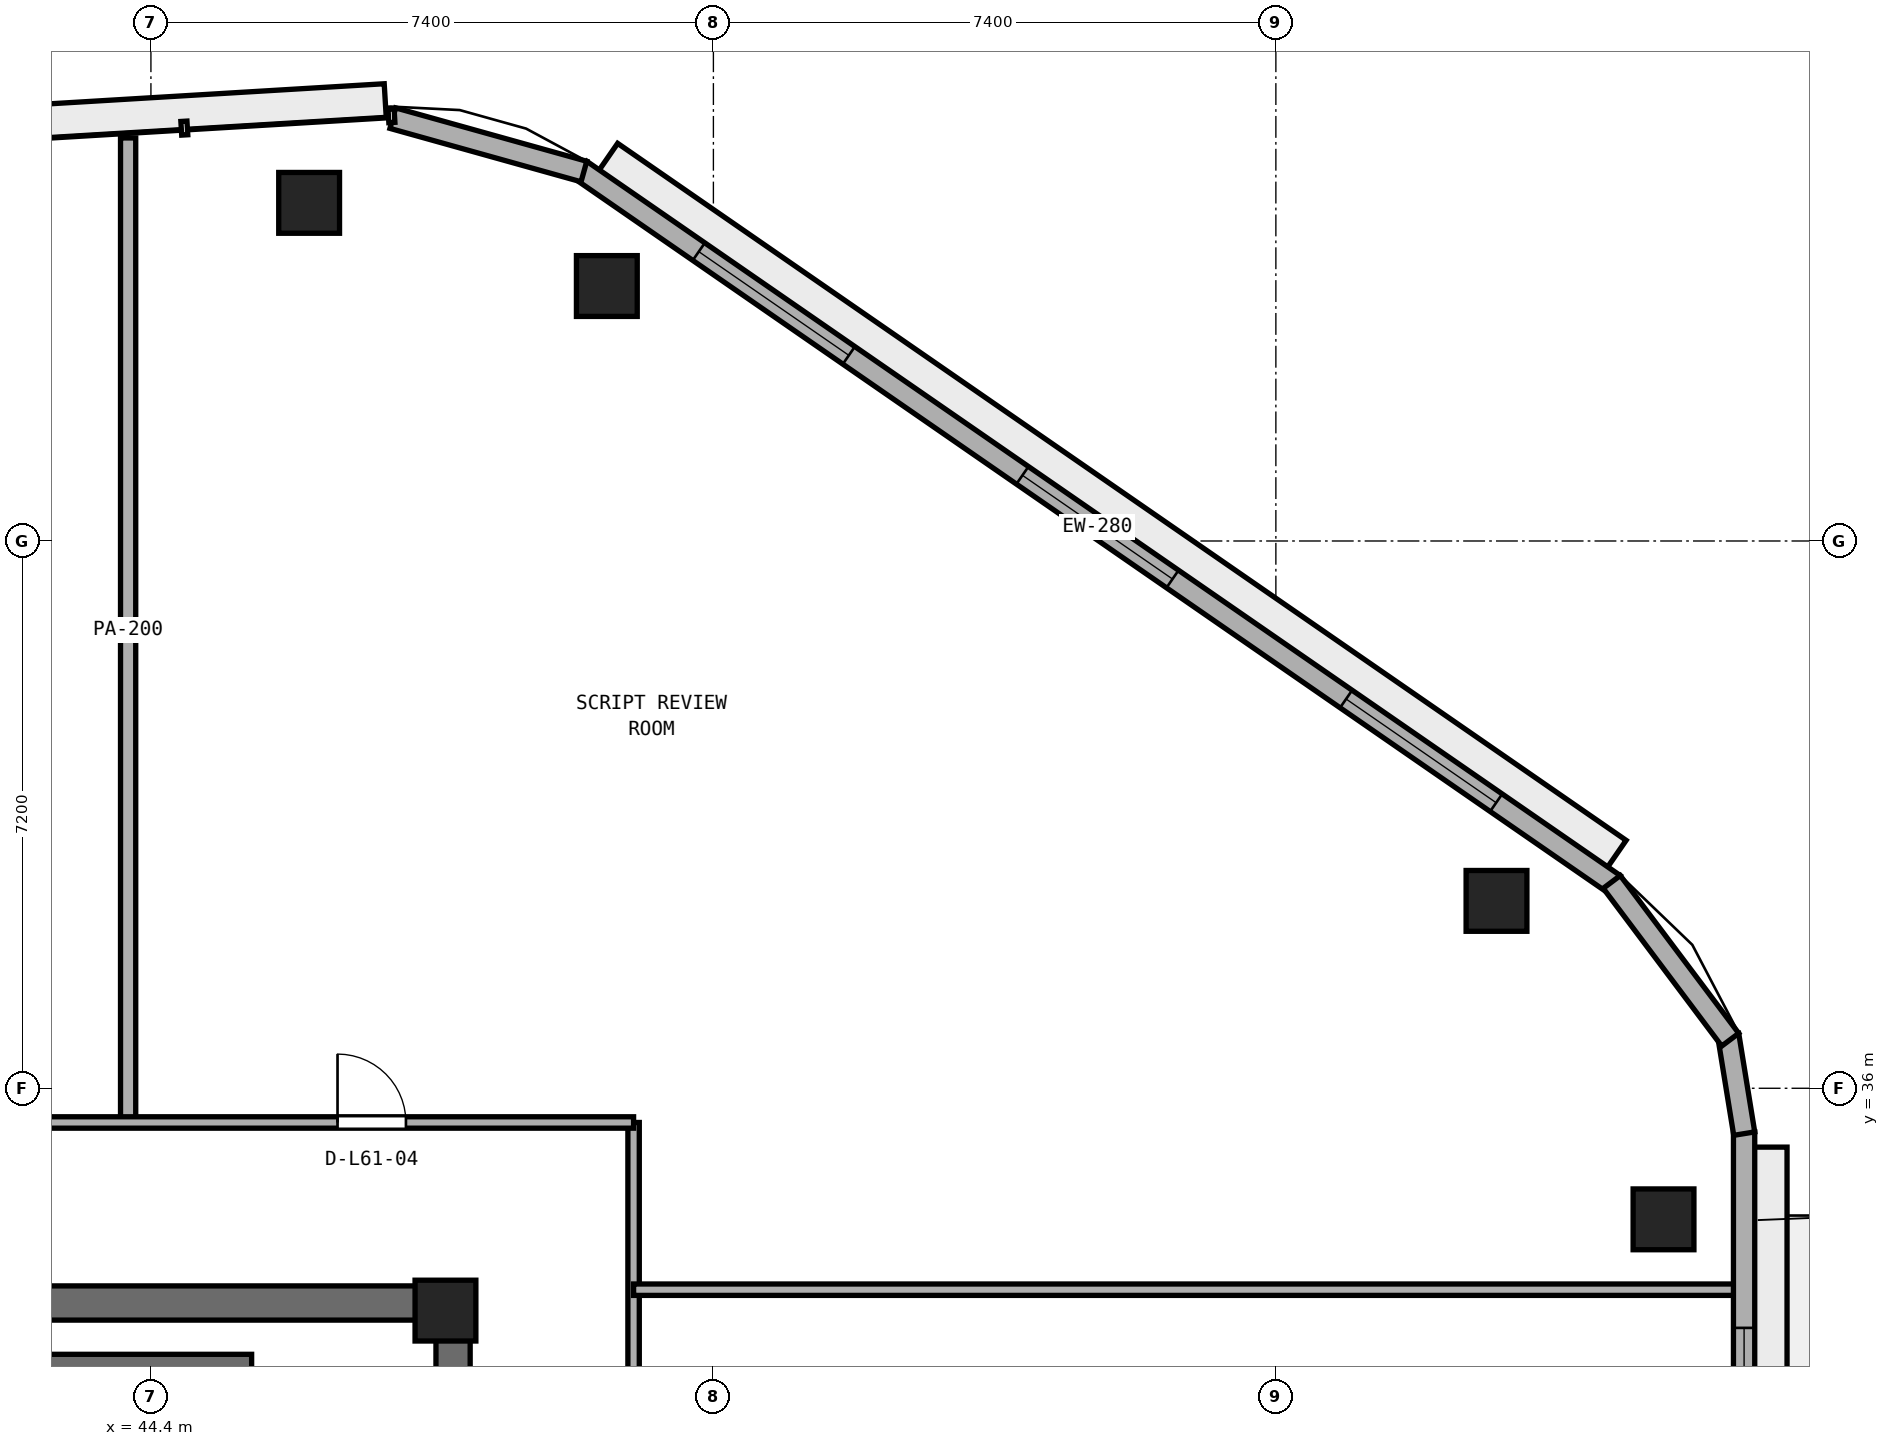
"""IFC4 building model, lengths in metres.
Left out: names, types, materials, properties, quantities, classifications, styles, units other than length and angle.
Written with IfcOpenShell. Run it as: python <this file> out.ifc"""

import sys

from ifc_helpers import new_model, si_unit, direction, frame, frame_2d, origin, origin_2d, place, context, subcontext, project, spatial, rectangle, extrude, element, fill, save


model = new_model("IFC4")
c1 = context("Model", 3, precision=1e-05, world=origin(), true_north=direction((0.0, 1.0)))
c2 = subcontext(c1, "Body", "Model", "MODEL_VIEW")
j1 = project(units=[si_unit("LENGTHUNIT", "METRE"), si_unit("PLANEANGLEUNIT", "RADIAN")], contexts=[c1])
p1 = place(None, origin())
s1 = spatial("IfcSite", under=j1, at=p1, CompositionType="ELEMENT")
p2 = place(p1, origin())
s2 = spatial("IfcBuilding", under=s1, at=p2, CompositionType="ELEMENT")
p3 = place(p2, frame((0.0, 0.0, 240.2)))
s3 = spatial("IfcBuildingStorey", under=s2, at=p3, CompositionType="ELEMENT", Elevation=240.2)
p4 = place(p3, frame((25.4, 33.175, 0.0), z_axis=(0.0, 0.0, 1.0), x_axis=(1.0, 0.0, 0.0)))
e1 = element("IfcWall", 1, at=p4, inside=s3, PredefinedType="SHEAR", context=c2, shape_type="SweptSolid", body=[
    extrude(rectangle(XDim=23.2, YDim=0.45, at=frame_2d((11.6, 0.0))), origin(), (0.0, 0.0, 1.0), 3.51),
])
p5 = place(p3, frame((48.375, 17.45, 0.0), z_axis=(0.0, 0.0, 1.0), x_axis=(0.0, 1.0, 0.0)))
e2 = element("IfcWall", 2, at=p5, inside=s3, PredefinedType="SHEAR", context=c2, shape_type="SweptSolid", body=[
    extrude(rectangle(XDim=15.5, YDim=0.45, at=frame_2d((7.75, 0.0))), origin(), (0.0, 0.0, 1.0), 3.51),
])
p6 = place(p5, frame((5.85, 0.0, 0.0)))
e3 = element("IfcOpeningElement", 3, at=p6, cuts=e2, PredefinedType="OPENING", context=c2, shape_type="SweptSolid", body=[
    extrude(rectangle(XDim=1.5, YDim=2.15, at=frame_2d((0.75, 1.075))), frame((0.0, 0.235, 0.0), z_axis=(0.0, -1.0, 0.0), x_axis=(1.0, 0.0, 0.0)), (0.0, 0.0, 1.0), 0.47),
])
p7 = place(p3, frame((48.275, 33.075, 0.0), z_axis=(0.0, 0.0, 1.0), x_axis=(1.0, 0.0, 0.0)))
e4 = element("IfcColumn", 4, at=p7, inside=s3, PredefinedType="PILASTER", context=c2, shape_type="SweptSolid", body=[
    extrude(rectangle(XDim=0.8, YDim=0.8, at=origin_2d()), origin(), (0.0, 0.0, 1.0), 3.8),
])
for number, where, z_axis, x_axis in (
    (5, (64.3, 34.276, 0.0), (0.0, 0.0, 1.0), (1.0, 0.0, 0.0)),
    (6, (62.103, 38.465, 0.0), (0.0, 0.0, 1.0), (1.0, 0.0, 0.0)),
    (7, (50.398, 46.554, 0.0), (0.0, 0.0, 1.0), (1.0, 0.0, 0.0)),
    (8, (46.481, 47.648, 0.0), (0.0, 0.0, 1.0), (1.0, 0.0, 0.0)),
):
    element("IfcColumn", number, at=place(p3, frame(where, z_axis=z_axis, x_axis=x_axis)), inside=s3, PredefinedType="COLUMN", context=c2, shape_type="SweptSolid", body=[
        extrude(rectangle(XDim=0.8, YDim=0.8, at=origin_2d()), origin(), (0.0, 0.0, 1.0), 3.8),
    ])
p8 = place(p3, frame((38.425, 32.375, 0.0), z_axis=(0.0, 0.0, 1.0), x_axis=(1.0, 0.0, 0.0)))
e9 = element("IfcWall", 9, at=p8, inside=s3, PredefinedType="SHEAR", context=c2, shape_type="SweptSolid", body=[
    extrude(rectangle(XDim=7.3, YDim=0.25, at=frame_2d((3.65, 0.0))), origin(), (0.0, 0.0, 1.0), 3.51),
])
p9 = place(p3, frame((50.75, 22.6, 0.0), z_axis=(0.0, 0.0, 1.0), x_axis=(0.0, 1.0, 0.0)))
e10 = element("IfcWall", 10, at=p9, inside=s3, PredefinedType="PARTITIONING", context=c2, shape_type="SweptSolid", body=[
    extrude(rectangle(XDim=12.95, YDim=0.15, at=frame_2d((6.475, 0.0))), origin(), (0.0, 0.0, 1.0), 3.51),
])
p10 = place(p9, frame((2.17, 0.0, 0.0)))
e11 = element("IfcOpeningElement", 11, at=p10, cuts=e10, PredefinedType="OPENING", context=c2, shape_type="SweptSolid", body=[
    extrude(rectangle(XDim=0.9, YDim=2.1, at=frame_2d((0.45, 1.05))), frame((0.0, 0.085, 0.0), z_axis=(0.0, -1.0, 0.0), x_axis=(1.0, 0.0, 0.0)), (0.0, 0.0, 1.0), 0.17),
])
p11 = place(p9, frame((7.375, 0.0, 0.0)))
e12 = element("IfcOpeningElement", 12, at=p11, cuts=e10, PredefinedType="OPENING", context=c2, shape_type="SweptSolid", body=[
    extrude(rectangle(XDim=1.0, YDim=2.12, at=frame_2d((0.5, 1.06))), frame((0.0, 0.085, 0.0), z_axis=(0.0, -1.0, 0.0), x_axis=(1.0, 0.0, 0.0)), (0.0, 0.0, 1.0), 0.17),
])
p12 = place(p3, frame((44.1, 35.55, 0.0), z_axis=(0.0, 0.0, 1.0), x_axis=(0.0, 1.0, 0.0)))
e13 = element("IfcWall", 13, at=p12, inside=s3, PredefinedType="PARTITIONING", context=c2, shape_type="SweptSolid", body=[
    extrude(rectangle(XDim=12.953, YDim=0.2, at=frame_2d((6.476, 0.0))), origin(), (0.0, 0.0, 1.0), 3.51),
])
p13 = place(p3, frame((50.75, 33.35, 0.0), z_axis=(0.0, 0.0, 1.0), x_axis=(1.0, 0.0, 0.0)))
e14 = element("IfcWall", 14, at=p13, inside=s3, PredefinedType="PARTITIONING", context=c2, shape_type="SweptSolid", body=[
    extrude(rectangle(XDim=14.545, YDim=0.15, at=frame_2d((7.272, 0.0))), origin(), (0.0, 0.0, 1.0), 2.893),
])
p14 = place(p3, frame((38.35, 35.55, 0.0), z_axis=(0.0, 0.0, 1.0), x_axis=(1.0, 0.0, 0.0)))
e15 = element("IfcWall", 15, at=p14, inside=s3, PredefinedType="PARTITIONING", context=c2, shape_type="SweptSolid", body=[
    extrude(rectangle(XDim=12.4, YDim=0.15, at=frame_2d((6.2, 0.0))), origin(), (0.0, 0.0, 1.0), 3.51),
])
p15 = place(p14, frame((8.505, 0.0, 0.0)))
e16 = element("IfcOpeningElement", 16, at=p15, cuts=e15, PredefinedType="OPENING", context=c2, shape_type="SweptSolid", body=[
    extrude(rectangle(XDim=0.9, YDim=2.1, at=frame_2d((0.45, 1.05))), frame((0.0, 0.085, 0.0), z_axis=(0.0, -1.0, 0.0), x_axis=(1.0, 0.0, 0.0)), (0.0, 0.0, 1.0), 0.17),
])
p16 = place(p3, frame((65.36, 16.258, 0.0), z_axis=(0.0, 0.0, 1.0), x_axis=(0.0, 1.0, 0.0)))
e17 = element("IfcWall", 17, at=p16, inside=s3, PredefinedType="STANDARD", context=c2, shape_type="SweptSolid", body=[
    extrude(rectangle(XDim=19.168, YDim=0.28, at=frame_2d((9.584, 0.0))), origin(), (0.0, 0.0, 1.0), 3.51),
])
p17 = place(p16, frame((9.034, 0.0, 0.0)))
e18 = element("IfcOpeningElement", 18, at=p17, cuts=e17, PredefinedType="OPENING", context=c2, shape_type="SweptSolid", body=[
    extrude(rectangle(XDim=1.1, YDim=2.2, at=frame_2d((0.55, 1.1))), frame((0.0, 0.15, 0.0), z_axis=(0.0, -1.0, 0.0), x_axis=(1.0, 0.0, 0.0)), (0.0, 0.0, 1.0), 0.3),
])
p18 = place(p16, frame((2.328, 0.0, 0.9)))
e19 = element("IfcOpeningElement", 19, at=p18, cuts=e17, PredefinedType="OPENING", context=c2, shape_type="SweptSolid", body=[
    extrude(rectangle(XDim=2.4, YDim=1.75, at=frame_2d((1.2, 0.875))), frame((0.0, 0.15, 0.0), z_axis=(0.0, -1.0, 0.0), x_axis=(1.0, 0.0, 0.0)), (0.0, 0.0, 1.0), 0.3),
])
p19 = place(p16, frame((14.19, 0.0, 0.9)))
e20 = element("IfcOpeningElement", 20, at=p19, cuts=e17, PredefinedType="OPENING", context=c2, shape_type="SweptSolid", body=[
    extrude(rectangle(XDim=2.4, YDim=1.75, at=frame_2d((1.2, 0.875))), frame((0.0, 0.15, 0.0), z_axis=(0.0, -1.0, 0.0), x_axis=(1.0, 0.0, 0.0)), (0.0, 0.0, 1.0), 0.3),
])
p20 = place(p3, frame((63.651, 38.683, 0.0), z_axis=(0.0, 0.0, 1.0), x_axis=(-0.822655095, 0.568540759022, 0.0)))
e21 = element("IfcWall", 21, at=p20, inside=s3, PredefinedType="STANDARD", context=c2, shape_type="SweptSolid", body=[
    extrude(rectangle(XDim=16.528, YDim=0.28, at=frame_2d((8.264, 0.0))), origin(), (0.0, 0.0, 1.0), 3.51),
])
p21 = place(p20, frame((1.888, 0.0, 0.9)))
e22 = element("IfcOpeningElement", 22, at=p21, cuts=e21, PredefinedType="OPENING", context=c2, shape_type="SweptSolid", body=[
    extrude(rectangle(XDim=2.4, YDim=1.75, at=frame_2d((1.2, 0.875))), frame((0.0, 0.15, 0.0), z_axis=(0.0, -1.0, 0.0), x_axis=(1.0, 0.0, 0.0)), (0.0, 0.0, 1.0), 0.3),
])
p22 = place(p20, frame((7.064, 0.0, 0.9)))
e23 = element("IfcOpeningElement", 23, at=p22, cuts=e21, PredefinedType="OPENING", context=c2, shape_type="SweptSolid", body=[
    extrude(rectangle(XDim=2.4, YDim=1.75, at=frame_2d((1.2, 0.875))), frame((0.0, 0.15, 0.0), z_axis=(0.0, -1.0, 0.0), x_axis=(1.0, 0.0, 0.0)), (0.0, 0.0, 1.0), 0.3),
])
p23 = place(p20, frame((12.24, 0.0, 0.9)))
e24 = element("IfcOpeningElement", 24, at=p23, cuts=e21, PredefinedType="OPENING", context=c2, shape_type="SweptSolid", body=[
    extrude(rectangle(XDim=2.4, YDim=1.75, at=frame_2d((1.2, 0.875))), frame((0.0, 0.15, 0.0), z_axis=(0.0, -1.0, 0.0), x_axis=(1.0, 0.0, 0.0)), (0.0, 0.0, 1.0), 0.3),
])
p24 = place(p3, frame((65.362, 35.403, 0.0), z_axis=(0.0, 0.0, 1.0), x_axis=(-0.160271674114, 0.987072940809, 0.0)))
e25 = element("IfcWall", 25, at=p24, inside=s3, PredefinedType="STANDARD", context=c2, shape_type="SweptSolid", body=[
    extrude(rectangle(XDim=1.315, YDim=0.28, at=frame_2d((0.657, 0.0))), origin(), (0.0, 0.0, 1.0), 3.51),
])
p25 = place(p3, frame((65.177, 36.639, 0.0), z_axis=(0.0, 0.0, 1.0), x_axis=(-0.600436386467, 0.799672524104, 0.0)))
e26 = element("IfcWall", 26, at=p25, inside=s3, PredefinedType="STANDARD", context=c2, shape_type="SweptSolid", body=[
    extrude(rectangle(XDim=2.595, YDim=0.28, at=frame_2d((1.298, 0.0))), origin(), (0.0, 0.0, 1.0), 3.51),
])
p26 = place(p3, frame((50.096, 48.061, 0.0), z_axis=(0.0, 0.0, 1.0), x_axis=(-0.963120241504, 0.269071366751, 0.0)))
e27 = element("IfcWall", 27, at=p26, inside=s3, PredefinedType="STANDARD", context=c2, shape_type="SweptSolid", body=[
    extrude(rectangle(XDim=2.61, YDim=0.28, at=frame_2d((1.305, 0.0))), origin(), (0.0, 0.0, 1.0), 3.51),
])
p27 = place(p15, origin())
e28 = element("IfcDoor", 28, at=p27, inside=s3, OperationType="SINGLE_SWING_LEFT", PredefinedType="DOOR", context=c2, shape_type="SweptSolid", body=[
    extrude(rectangle(XDim=0.9, YDim=2.1, at=frame_2d((0.45, 1.05))), frame((0.0, 0.025, 0.0), z_axis=(0.0, -1.0, 0.0), x_axis=(1.0, 0.0, 0.0)), (0.0, 0.0, 1.0), 0.05),
])
fill(e16, e28)
p28 = place(p19, origin())
e29 = element("IfcWindow", 29, at=p28, inside=s3, PartitioningType="SINGLE_PANEL", PredefinedType="WINDOW", context=c2, shape_type="SweptSolid", body=[
    extrude(rectangle(XDim=2.4, YDim=1.75, at=frame_2d((1.2, 0.875))), frame((0.0, 0.03, 0.0), z_axis=(0.0, -1.0, 0.0), x_axis=(1.0, 0.0, 0.0)), (0.0, 0.0, 1.0), 0.06),
])
fill(e20, e29)
p29 = place(p21, origin())
e30 = element("IfcWindow", 30, at=p29, inside=s3, PartitioningType="SINGLE_PANEL", PredefinedType="WINDOW", context=c2, shape_type="SweptSolid", body=[
    extrude(rectangle(XDim=2.4, YDim=1.75, at=frame_2d((1.2, 0.875))), frame((0.0, 0.03, 0.0), z_axis=(0.0, -1.0, 0.0), x_axis=(1.0, 0.0, 0.0)), (0.0, 0.0, 1.0), 0.06),
])
fill(e22, e30)
p30 = place(p22, origin())
e31 = element("IfcWindow", 31, at=p30, inside=s3, PartitioningType="SINGLE_PANEL", PredefinedType="WINDOW", context=c2, shape_type="SweptSolid", body=[
    extrude(rectangle(XDim=2.4, YDim=1.75, at=frame_2d((1.2, 0.875))), frame((0.0, 0.03, 0.0), z_axis=(0.0, -1.0, 0.0), x_axis=(1.0, 0.0, 0.0)), (0.0, 0.0, 1.0), 0.06),
])
fill(e23, e31)
p31 = place(p23, origin())
e32 = element("IfcWindow", 32, at=p31, inside=s3, PartitioningType="SINGLE_PANEL", PredefinedType="WINDOW", context=c2, shape_type="SweptSolid", body=[
    extrude(rectangle(XDim=2.4, YDim=1.75, at=frame_2d((1.2, 0.875))), frame((0.0, 0.03, 0.0), z_axis=(0.0, -1.0, 0.0), x_axis=(1.0, 0.0, 0.0)), (0.0, 0.0, 1.0), 0.06),
])
fill(e24, e32)
save(model, sys.argv[1])
